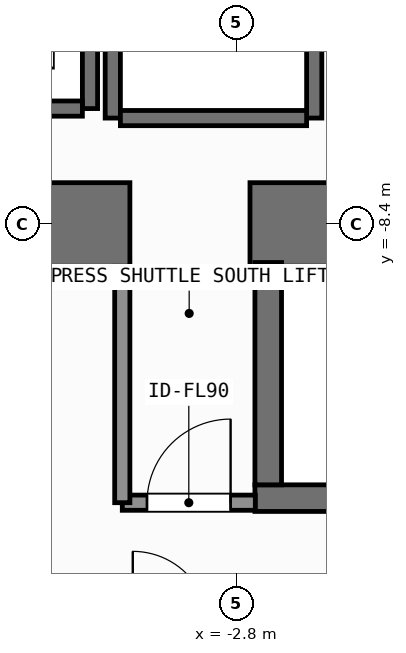
"""IFC4 building model, lengths in metres.
Left out: names, types, materials, properties, quantities, classifications, styles, units other than length and angle.
Written with IfcOpenShell. Run it as: python <this file> out.ifc"""

import sys

from ifc_helpers import new_model, si_unit, direction, frame, frame_2d, origin, place, context, subcontext, project, spatial, rectangle, extrude, element, fill, save


model = new_model("IFC4")
c1 = context("Model", 3, precision=1e-05, world=origin(), true_north=direction((0.0, 1.0)))
c2 = subcontext(c1, "Body", "Model", "MODEL_VIEW")
j1 = project(units=[si_unit("LENGTHUNIT", "METRE"), si_unit("PLANEANGLEUNIT", "RADIAN")], contexts=[c1])
p1 = place(None, origin())
s1 = spatial("IfcSite", under=j1, at=p1, CompositionType="ELEMENT")
p2 = place(p1, origin())
s2 = spatial("IfcBuilding", under=s1, at=p2, CompositionType="ELEMENT")
p3 = place(p2, frame((0.0, 0.0, 34.5)))
s3 = spatial("IfcBuildingStorey", under=s2, at=p3, CompositionType="ELEMENT", Elevation=34.5)
p4 = place(p3, frame((-7.55, -8.4, 0.0), z_axis=(0.0, 0.0, 1.0), x_axis=(1.0, 0.0, 0.0)))
e1 = element("IfcWall", 1, at=p4, inside=s3, PredefinedType="SHEAR", context=c2, shape_type="SweptSolid", body=[
    extrude(rectangle(XDim=3.35, YDim=1.1, at=frame_2d((1.675, 0.0))), origin(), (0.0, 0.0, 1.0), 3.9),
])
p5 = place(p3, frame((-2.62, -8.4, 0.0), z_axis=(0.0, 0.0, 1.0), x_axis=(1.0, 0.0, 0.0)))
e2 = element("IfcWall", 2, at=p5, inside=s3, PredefinedType="SHEAR", context=c2, shape_type="SweptSolid", body=[
    extrude(rectangle(XDim=7.27, YDim=1.1, at=frame_2d((3.635, 0.0))), origin(), (0.0, 0.0, 1.0), 3.9),
])
p6 = place(p3, frame((-2.555, -12.0, 0.0), z_axis=(0.0, 0.0, 1.0), x_axis=(1.0, 0.0, 0.0)))
e3 = element("IfcWall", 3, at=p6, inside=s3, PredefinedType="SHEAR", context=c2, shape_type="SweptSolid", body=[
    extrude(rectangle(XDim=7.31, YDim=0.35, at=frame_2d((3.655, 0.0))), origin(), (0.0, 0.0, 1.0), 3.9),
])
p7 = place(p3, frame((-2.2, -8.988, 0.0), z_axis=(0.0, 0.0, 1.0), x_axis=(1.0, 0.0, 0.0)))
e4 = element("IfcWall", 4, at=p7, inside=s3, PredefinedType="SHEAR", context=c2, shape_type="SweptSolid", body=[
    extrude(rectangle(XDim=6.6, YDim=0.075, at=frame_2d((3.3, 0.0))), origin(), (0.0, 0.0, 1.0), 3.9),
])
p8 = place(p3, frame((-2.38, -11.825, 0.0), z_axis=(0.0, 0.0, 1.0), x_axis=(0.0, 1.0, 0.0)))
e5 = element("IfcWall", 5, at=p8, inside=s3, PredefinedType="SHEAR", context=c2, shape_type="SweptSolid", body=[
    extrude(rectangle(XDim=2.925, YDim=0.35, at=frame_2d((1.462, 0.0))), origin(), (0.0, 0.0, 1.0), 3.9),
])
p9 = place(p3, frame((-4.725, -6.875, 0.0), z_axis=(0.0, 0.0, 1.0), x_axis=(0.0, 1.0, 0.0)))
e6 = element("IfcWall", 6, at=p9, inside=s3, PredefinedType="SHEAR", context=c2, shape_type="SweptSolid", body=[
    extrude(rectangle(XDim=2.55, YDim=0.2, at=frame_2d((1.275, 0.0))), origin(), (0.0, 0.0, 1.0), 3.68),
])
p10 = place(p3, frame((-7.175, -6.875, 0.0), z_axis=(0.0, 0.0, 1.0), x_axis=(1.0, 0.0, 0.0)))
e7 = element("IfcWall", 7, at=p10, inside=s3, PredefinedType="SHEAR", context=c2, shape_type="SweptSolid", body=[
    extrude(rectangle(XDim=2.35, YDim=0.2, at=frame_2d((1.175, 0.0))), origin(), (0.0, 0.0, 1.0), 3.68),
])
for number, where, z_axis, x_axis in (
    (8, (-4.425, -7.0, 0.0), (0.0, 0.0, 1.0), (0.0, 1.0, 0.0)),
    (9, (-1.775, -7.0, 0.0), (0.0, 0.0, 1.0), (0.0, 1.0, 0.0)),
):
    element("IfcWall", number, at=place(p3, frame(where, z_axis=z_axis, x_axis=x_axis)), inside=s3, PredefinedType="SHEAR", context=c2, shape_type="SweptSolid", body=[
        extrude(rectangle(XDim=2.8, YDim=0.2, at=frame_2d((1.4, 0.0))), origin(), (0.0, 0.0, 1.0), 3.68),
    ])
p11 = place(p3, frame((-4.325, -7.0, 0.0), z_axis=(0.0, 0.0, 1.0), x_axis=(1.0, 0.0, 0.0)))
e10 = element("IfcWall", 10, at=p11, inside=s3, PredefinedType="SHEAR", context=c2, shape_type="SweptSolid", body=[
    extrude(rectangle(XDim=2.45, YDim=0.2, at=frame_2d((1.225, 0.0))), origin(), (0.0, 0.0, 1.0), 3.68),
])
p12 = place(p3, frame((-4.3, -12.06, 0.0), z_axis=(0.0, 0.0, 1.0), x_axis=(1.0, 0.0, 0.0)))
e11 = element("IfcWall", 11, at=p12, inside=s3, PredefinedType="SOLIDWALL", context=c2, shape_type="SweptSolid", body=[
    extrude(rectangle(XDim=1.75, YDim=0.2, at=frame_2d((0.875, 0.0))), origin(), (0.0, 0.0, 1.0), 3.68),
])
p13 = place(p12, frame((0.325, 0.0, 0.0)))
e12 = element("IfcOpeningElement", 12, at=p13, cuts=e11, PredefinedType="OPENING", context=c2, shape_type="SweptSolid", body=[
    extrude(rectangle(XDim=1.1, YDim=2.15, at=frame_2d((0.55, 1.075))), frame((0.0, 0.11, 0.0), z_axis=(0.0, -1.0, 0.0), x_axis=(1.0, 0.0, 0.0)), (0.0, 0.0, 1.0), 0.22),
])
p14 = place(p3, frame((-4.3, -12.06, 0.0), z_axis=(0.0, 0.0, 1.0), x_axis=(0.0, 1.0, 0.0)))
e13 = element("IfcWall", 13, at=p14, inside=s3, PredefinedType="SOLIDWALL", context=c2, shape_type="SweptSolid", body=[
    extrude(rectangle(XDim=3.11, YDim=0.2, at=frame_2d((1.555, 0.0))), origin(), (0.0, 0.0, 1.0), 3.68),
])
p15 = place(p13, origin())
e14 = element("IfcDoor", 14, at=p15, inside=s3, OperationType="SINGLE_SWING_RIGHT", PredefinedType="DOOR", context=c2, shape_type="SweptSolid", body=[
    extrude(rectangle(XDim=1.1, YDim=2.15, at=frame_2d((0.55, 1.075))), frame((0.0, 0.025, 0.0), z_axis=(0.0, -1.0, 0.0), x_axis=(1.0, 0.0, 0.0)), (0.0, 0.0, 1.0), 0.05),
])
fill(e12, e14)
save(model, sys.argv[1])
